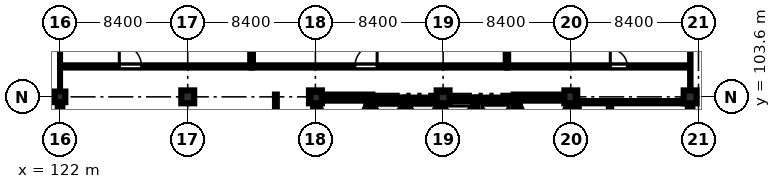
"""IFC4 building model, lengths in metres.
Left out: names, types, materials, properties, quantities, classifications, styles, units other than length and angle.
Written with IfcOpenShell. Run it as: python <this file> out.ifc"""

import sys

from ifc_helpers import new_model, si_unit, direction, frame, frame_2d, origin, origin_2d, place, context, subcontext, project, spatial, rectangle, extrude, element, fill, save


model = new_model("IFC4")
c1 = context("Model", 3, precision=1e-05, world=origin(), true_north=direction((0.0, 1.0)))
c2 = subcontext(c1, "Body", "Model", "MODEL_VIEW")
j1 = project(units=[si_unit("LENGTHUNIT", "METRE"), si_unit("PLANEANGLEUNIT", "RADIAN")], contexts=[c1])
p1 = place(None, origin())
s1 = spatial("IfcSite", under=j1, at=p1, CompositionType="ELEMENT")
p2 = place(p1, origin())
s2 = spatial("IfcBuilding", under=s1, at=p2, CompositionType="ELEMENT")
p3 = place(p2, frame((0.0, 0.0, 23.4)))
s3 = spatial("IfcBuildingStorey", under=s2, at=p3, CompositionType="ELEMENT", Elevation=23.4)
p4 = place(p3, frame((122.0, 103.6, 0.0), z_axis=(0.0, 0.0, 1.0), x_axis=(1.0, 0.0, 0.0)))
e1 = element("IfcColumn", 1, at=p4, inside=s3, PredefinedType="COLUMN", context=c2, shape_type="SweptSolid", body=[
    extrude(rectangle(XDim=0.7, YDim=0.7, at=origin_2d()), origin(), (0.0, 0.0, 1.0), 4.0),
])
for number, where, z_axis, x_axis in (
    (2, (130.4, 103.6, 0.0), (0.0, 0.0, 1.0), (1.0, 0.0, 0.0)),
    (3, (138.8, 103.6, 0.0), (0.0, 0.0, 1.0), (1.0, 0.0, 0.0)),
    (4, (147.2, 103.6, 0.0), (0.0, 0.0, 1.0), (1.0, 0.0, 0.0)),
    (5, (155.6, 103.6, 0.0), (0.0, 0.0, 1.0), (1.0, 0.0, 0.0)),
    (6, (163.45, 103.6, 0.0), (0.0, 0.0, 1.0), (1.0, 0.0, 0.0)),
):
    element("IfcColumn", number, at=place(p3, frame(where, z_axis=z_axis, x_axis=x_axis)), inside=s3, PredefinedType="COLUMN", context=c2, shape_type="SweptSolid", body=[
        extrude(rectangle(XDim=0.85, YDim=0.85, at=origin_2d()), origin(), (0.0, 0.0, 1.0), 4.0),
    ])
p5 = place(p3, frame((138.65, 103.55, 0.0), z_axis=(0.0, 0.0, 1.0), x_axis=(1.0, 0.0, 0.0)))
e7 = element("IfcWall", 7, at=p5, inside=s3, PredefinedType="SHEAR", context=c2, shape_type="SweptSolid", body=[
    extrude(rectangle(XDim=3.9, YDim=0.4, at=frame_2d((1.95, 0.0))), origin(), (0.0, 0.0, 1.0), 4.0),
])
p6 = place(p3, frame((138.85, 95.45, 0.0), z_axis=(0.0, 0.0, 1.0), x_axis=(0.0, 1.0, 0.0)))
e8 = element("IfcWall", 8, at=p6, inside=s3, PredefinedType="SHEAR", context=c2, shape_type="SweptSolid", body=[
    extrude(rectangle(XDim=7.9, YDim=0.4, at=frame_2d((3.95, 0.0))), origin(), (0.0, 0.0, 1.0), 4.0),
])
p7 = place(p3, frame((142.35, 95.45, 0.0), z_axis=(0.0, 0.0, 1.0), x_axis=(0.0, 1.0, 0.0)))
e9 = element("IfcWall", 9, at=p7, inside=s3, PredefinedType="SHEAR", context=c2, shape_type="SweptSolid", body=[
    extrude(rectangle(XDim=7.9, YDim=0.4, at=frame_2d((3.95, 0.0))), origin(), (0.0, 0.0, 1.0), 4.0),
])
p8 = place(p7, frame((0.22, 0.0, 0.0)))
e10 = element("IfcOpeningElement", 10, at=p8, cuts=e9, PredefinedType="OPENING", context=c2, shape_type="SweptSolid", body=[
    extrude(rectangle(XDim=1.15, YDim=2.15, at=frame_2d((0.575, 1.075))), frame((0.0, 0.21, 0.0), z_axis=(0.0, -1.0, 0.0), x_axis=(1.0, 0.0, 0.0)), (0.0, 0.0, 1.0), 0.42),
])
p9 = place(p3, frame((151.85, 103.55, 0.0), z_axis=(0.0, 0.0, 1.0), x_axis=(1.0, 0.0, 0.0)))
e11 = element("IfcWall", 11, at=p9, inside=s3, PredefinedType="SHEAR", context=c2, shape_type="SweptSolid", body=[
    extrude(rectangle(XDim=3.9, YDim=0.4, at=frame_2d((1.95, 0.0))), origin(), (0.0, 0.0, 1.0), 4.0),
])
p10 = place(p3, frame((152.05, 95.45, 0.0), z_axis=(0.0, 0.0, 1.0), x_axis=(0.0, 1.0, 0.0)))
e12 = element("IfcWall", 12, at=p10, inside=s3, PredefinedType="SHEAR", context=c2, shape_type="SweptSolid", body=[
    extrude(rectangle(XDim=7.9, YDim=0.4, at=frame_2d((3.95, 0.0))), origin(), (0.0, 0.0, 1.0), 4.0),
])
p11 = place(p10, frame((0.35, 0.0, 0.0)))
e13 = element("IfcOpeningElement", 13, at=p11, cuts=e12, PredefinedType="OPENING", context=c2, shape_type="SweptSolid", body=[
    extrude(rectangle(XDim=1.15, YDim=2.15, at=frame_2d((0.575, 1.075))), frame((0.0, 0.21, 0.0), z_axis=(0.0, -1.0, 0.0), x_axis=(1.0, 0.0, 0.0)), (0.0, 0.0, 1.0), 0.42),
])
p12 = place(p3, frame((155.55, 95.45, 0.0), z_axis=(0.0, 0.0, 1.0), x_axis=(0.0, 1.0, 0.0)))
e14 = element("IfcWall", 14, at=p12, inside=s3, PredefinedType="SHEAR", context=c2, shape_type="SweptSolid", body=[
    extrude(rectangle(XDim=7.9, YDim=0.4, at=frame_2d((3.95, 0.0))), origin(), (0.0, 0.0, 1.0), 4.0),
])
p13 = place(p3, frame((142.55, 103.425, 0.0), z_axis=(0.0, 0.0, 1.0), x_axis=(1.0, 0.0, 0.0)))
e15 = element("IfcWall", 15, at=p13, inside=s3, PredefinedType="SHEAR", context=c2, shape_type="SweptSolid", body=[
    extrude(rectangle(XDim=2.05, YDim=0.25, at=frame_2d((1.025, 0.0))), origin(), (0.0, 0.0, 1.0), 4.0),
])
p14 = place(p3, frame((144.725, 100.15, 0.0), z_axis=(0.0, 0.0, 1.0), x_axis=(0.0, 1.0, 0.0)))
e16 = element("IfcWall", 16, at=p14, inside=s3, PredefinedType="SHEAR", context=c2, shape_type="SweptSolid", body=[
    extrude(rectangle(XDim=3.4, YDim=0.25, at=frame_2d((1.7, 0.0))), origin(), (0.0, 0.0, 1.0), 4.0),
])
p15 = place(p3, frame((144.85, 103.425, 0.0), z_axis=(0.0, 0.0, 1.0), x_axis=(1.0, 0.0, 0.0)))
e17 = element("IfcWall", 17, at=p15, inside=s3, PredefinedType="SHEAR", context=c2, shape_type="SweptSolid", body=[
    extrude(rectangle(XDim=2.05, YDim=0.25, at=frame_2d((1.025, 0.0))), origin(), (0.0, 0.0, 1.0), 4.0),
])
p16 = place(p3, frame((147.025, 100.15, 0.0), z_axis=(0.0, 0.0, 1.0), x_axis=(0.0, 1.0, 0.0)))
e18 = element("IfcWall", 18, at=p16, inside=s3, PredefinedType="SHEAR", context=c2, shape_type="SweptSolid", body=[
    extrude(rectangle(XDim=3.4, YDim=0.25, at=frame_2d((1.7, 0.0))), origin(), (0.0, 0.0, 1.0), 4.0),
])
p17 = place(p3, frame((147.15, 103.425, 0.0), z_axis=(0.0, 0.0, 1.0), x_axis=(1.0, 0.0, 0.0)))
e19 = element("IfcWall", 19, at=p17, inside=s3, PredefinedType="SHEAR", context=c2, shape_type="SweptSolid", body=[
    extrude(rectangle(XDim=2.05, YDim=0.25, at=frame_2d((1.025, 0.0))), origin(), (0.0, 0.0, 1.0), 4.0),
])
p18 = place(p3, frame((149.325, 100.35, 0.0), z_axis=(0.0, 0.0, 1.0), x_axis=(0.0, 1.0, 0.0)))
e20 = element("IfcWall", 20, at=p18, inside=s3, PredefinedType="SHEAR", context=c2, shape_type="SweptSolid", body=[
    extrude(rectangle(XDim=3.2, YDim=0.25, at=frame_2d((1.6, 0.0))), origin(), (0.0, 0.0, 1.0), 4.0),
])
p19 = place(p3, frame((149.45, 103.425, 0.0), z_axis=(0.0, 0.0, 1.0), x_axis=(1.0, 0.0, 0.0)))
e21 = element("IfcWall", 21, at=p19, inside=s3, PredefinedType="SHEAR", context=c2, shape_type="SweptSolid", body=[
    extrude(rectangle(XDim=2.4, YDim=0.25, at=frame_2d((1.2, 0.0))), origin(), (0.0, 0.0, 1.0), 4.0),
])
p20 = place(p3, frame((163.45, 103.175, 0.0), z_axis=(0.0, 0.0, 1.0), x_axis=(0.0, -1.0, 0.0)))
e22 = element("IfcWall", 22, at=p20, inside=s3, PredefinedType="STANDARD", context=c2, shape_type="SweptSolid", body=[
    extrude(rectangle(XDim=7.55, YDim=0.3, at=frame_2d((3.775, 0.0))), origin(), (0.0, 0.0, 1.0), 3.3),
])
p21 = place(p20, frame((1.15, 0.0, 1.1)))
e23 = element("IfcOpeningElement", 23, at=p21, cuts=e22, PredefinedType="OPENING", context=c2, shape_type="SweptSolid", body=[
    extrude(rectangle(XDim=1.4, YDim=1.4, at=frame_2d((0.7, 0.7))), frame((0.0, 0.16, 0.0), z_axis=(0.0, -1.0, 0.0), x_axis=(1.0, 0.0, 0.0)), (0.0, 0.0, 1.0), 0.32),
])
p22 = place(p3, frame((122.0, 95.55, 0.0), z_axis=(0.0, 0.0, 1.0), x_axis=(0.0, 1.0, 0.0)))
e24 = element("IfcWall", 24, at=p22, inside=s3, PredefinedType="STANDARD", context=c2, shape_type="SweptSolid", body=[
    extrude(rectangle(XDim=7.7, YDim=0.3, at=frame_2d((3.85, 0.0))), origin(), (0.0, 0.0, 1.0), 3.3),
])
p23 = place(p22, frame((2.4, 0.0, 1.0)))
e25 = element("IfcOpeningElement", 25, at=p23, cuts=e24, PredefinedType="OPENING", context=c2, shape_type="SweptSolid", body=[
    extrude(rectangle(XDim=1.8, YDim=1.8, at=frame_2d((0.9, 0.9))), frame((0.0, 0.16, 0.0), z_axis=(0.0, -1.0, 0.0), x_axis=(1.0, 0.0, 0.0)), (0.0, 0.0, 1.0), 0.32),
])
p24 = place(p3, frame((158.18, 94.68, 0.0), z_axis=(0.0, 0.0, 1.0), x_axis=(0.0, 1.0, 0.0)))
e26 = element("IfcWall", 26, at=p24, inside=s3, PredefinedType="PARTITIONING", context=c2, shape_type="SweptSolid", body=[
    extrude(rectangle(XDim=8.57, YDim=0.15, at=frame_2d((4.285, 0.0))), origin(), (0.0, 0.0, 1.0), 4.0),
])
p25 = place(p24, frame((0.8, 0.0, 0.0)))
e27 = element("IfcOpeningElement", 27, at=p25, cuts=e26, PredefinedType="OPENING", context=c2, shape_type="SweptSolid", body=[
    extrude(rectangle(XDim=1.0, YDim=2.12, at=frame_2d((0.5, 1.06))), frame((0.0, 0.085, 0.0), z_axis=(0.0, -1.0, 0.0), x_axis=(1.0, 0.0, 0.0)), (0.0, 0.0, 1.0), 0.17),
])
p26 = place(p24, frame((3.5, 0.0, 0.0)))
e28 = element("IfcOpeningElement", 28, at=p26, cuts=e26, PredefinedType="OPENING", context=c2, shape_type="SweptSolid", body=[
    extrude(rectangle(XDim=0.92, YDim=2.1, at=frame_2d((0.46, 1.05))), frame((0.0, 0.085, 0.0), z_axis=(0.0, -1.0, 0.0), x_axis=(1.0, 0.0, 0.0)), (0.0, 0.0, 1.0), 0.17),
])
p27 = place(p24, frame((6.4, 0.0, 0.0)))
e29 = element("IfcOpeningElement", 29, at=p27, cuts=e26, PredefinedType="OPENING", context=c2, shape_type="SweptSolid", body=[
    extrude(rectangle(XDim=0.92, YDim=2.1, at=frame_2d((0.46, 1.05))), frame((0.0, 0.085, 0.0), z_axis=(0.0, -1.0, 0.0), x_axis=(1.0, 0.0, 0.0)), (0.0, 0.0, 1.0), 0.17),
])
p28 = place(p3, frame((156.05, 103.25, 0.0), z_axis=(0.0, 0.0, 1.0), x_axis=(1.0, 0.0, 0.0)))
e30 = element("IfcWall", 30, at=p28, inside=s3, PredefinedType="PARTITIONING", context=c2, shape_type="SweptSolid", body=[
    extrude(rectangle(XDim=7.15, YDim=0.15, at=frame_2d((3.575, 0.0))), origin(), (0.0, 0.0, 1.0), 4.0),
])
p29 = place(p3, frame((156.05, 94.68, 0.0), z_axis=(0.0, 0.0, 1.0), x_axis=(0.0, 1.0, 0.0)))
e31 = element("IfcWall", 31, at=p29, inside=s3, PredefinedType="PARTITIONING", context=c2, shape_type="SweptSolid", body=[
    extrude(rectangle(XDim=8.57, YDim=0.15, at=frame_2d((4.285, 0.0))), origin(), (0.0, 0.0, 1.0), 4.0),
])
p30 = place(p3, frame((136.2, 94.68, 0.0), z_axis=(0.0, 0.0, 1.0), x_axis=(0.0, 1.0, 0.0)))
e32 = element("IfcWall", 32, at=p30, inside=s3, PredefinedType="PARTITIONING", context=c2, shape_type="SweptSolid", body=[
    extrude(rectangle(XDim=9.07, YDim=0.12, at=frame_2d((4.535, 0.0))), origin(), (0.0, 0.0, 1.0), 4.0),
])
p31 = place(p3, frame((122.15, 105.6, 0.0), z_axis=(0.0, 0.0, 1.0), x_axis=(1.0, 0.0, 0.0)))
e33 = element("IfcWall", 33, at=p31, inside=s3, PredefinedType="PARTITIONING", context=c2, shape_type="SweptSolid", body=[
    extrude(rectangle(XDim=12.45, YDim=0.145, at=frame_2d((6.225, 0.0))), origin(), (0.0, 0.0, 1.0), 4.0),
])
p32 = place(p31, frame((3.75, 0.0, 0.0)))
e34 = element("IfcOpeningElement", 34, at=p32, cuts=e33, PredefinedType="OPENING", context=c2, shape_type="SweptSolid", body=[
    extrude(rectangle(XDim=1.46, YDim=2.22, at=frame_2d((0.73, 1.11))), frame((0.0, 0.083, 0.0), z_axis=(0.0, -1.0, 0.0), x_axis=(1.0, 0.0, 0.0)), (0.0, 0.0, 1.0), 0.165),
])
p33 = place(p3, frame((134.6, 105.6, 0.0), z_axis=(0.0, 0.0, 1.0), x_axis=(1.0, 0.0, 0.0)))
e35 = element("IfcWall", 35, at=p33, inside=s3, PredefinedType="PARTITIONING", context=c2, shape_type="SweptSolid", body=[
    extrude(rectangle(XDim=16.8, YDim=0.145, at=frame_2d((8.4, 0.0))), origin(), (0.0, 0.0, 1.0), 4.0),
])
p34 = place(p33, frame((6.8, 0.0, 0.0)))
e36 = element("IfcOpeningElement", 36, at=p34, cuts=e35, PredefinedType="OPENING", context=c2, shape_type="SweptSolid", body=[
    extrude(rectangle(XDim=1.46, YDim=2.22, at=frame_2d((0.73, 1.11))), frame((0.0, 0.083, 0.0), z_axis=(0.0, -1.0, 0.0), x_axis=(1.0, 0.0, 0.0)), (0.0, 0.0, 1.0), 0.165),
])
p35 = place(p3, frame((134.6, 105.6, 0.0), z_axis=(0.0, 0.0, 1.0), x_axis=(0.0, 1.0, 0.0)))
e37 = element("IfcWall", 37, at=p35, inside=s3, PredefinedType="STANDARD", context=c2, shape_type="SweptSolid", body=[
    extrude(rectangle(XDim=5.75, YDim=0.18, at=frame_2d((2.875, 0.0))), origin(), (0.0, 0.0, 1.0), 3.5),
])
p36 = place(p3, frame((151.4, 105.6, 0.0), z_axis=(0.0, 0.0, 1.0), x_axis=(1.0, 0.0, 0.0)))
e38 = element("IfcWall", 38, at=p36, inside=s3, PredefinedType="PARTITIONING", context=c2, shape_type="SweptSolid", body=[
    extrude(rectangle(XDim=11.95, YDim=0.145, at=frame_2d((5.975, 0.0))), origin(), (0.0, 0.0, 1.0), 4.0),
])
p37 = place(p36, frame((6.8, 0.0, 0.0)))
e39 = element("IfcOpeningElement", 39, at=p37, cuts=e38, PredefinedType="OPENING", context=c2, shape_type="SweptSolid", body=[
    extrude(rectangle(XDim=1.12, YDim=2.18, at=frame_2d((0.56, 1.09))), frame((0.0, 0.083, 0.0), z_axis=(0.0, -1.0, 0.0), x_axis=(1.0, 0.0, 0.0)), (0.0, 0.0, 1.0), 0.165),
])
p38 = place(p3, frame((151.4, 105.6, 0.0), z_axis=(0.0, 0.0, 1.0), x_axis=(0.0, 1.0, 0.0)))
e40 = element("IfcWall", 40, at=p38, inside=s3, PredefinedType="PARTITIONING", context=c2, shape_type="SweptSolid", body=[
    extrude(rectangle(XDim=5.75, YDim=0.158, at=frame_2d((2.875, 0.0))), origin(), (0.0, 0.0, 1.0), 3.5),
])
p39 = place(p32, origin())
e41 = element("IfcDoor", 41, at=p39, inside=s3, OperationType="SINGLE_SWING_LEFT", PredefinedType="DOOR", context=c2, shape_type="SweptSolid", body=[
    extrude(rectangle(XDim=1.46, YDim=2.22, at=frame_2d((0.73, 1.11))), frame((0.0, 0.025, 0.0), z_axis=(0.0, -1.0, 0.0), x_axis=(1.0, 0.0, 0.0)), (0.0, 0.0, 1.0), 0.05),
])
fill(e34, e41)
p40 = place(p34, origin())
e42 = element("IfcDoor", 42, at=p40, inside=s3, OperationType="SINGLE_SWING_RIGHT", PredefinedType="DOOR", context=c2, shape_type="SweptSolid", body=[
    extrude(rectangle(XDim=1.46, YDim=2.22, at=frame_2d((0.73, 1.11))), frame((0.0, 0.025, 0.0), z_axis=(0.0, -1.0, 0.0), x_axis=(1.0, 0.0, 0.0)), (0.0, 0.0, 1.0), 0.05),
])
fill(e36, e42)
p41 = place(p37, origin())
e43 = element("IfcDoor", 43, at=p41, inside=s3, OperationType="SINGLE_SWING_LEFT", PredefinedType="DOOR", context=c2, shape_type="SweptSolid", body=[
    extrude(rectangle(XDim=1.12, YDim=2.18, at=frame_2d((0.56, 1.09))), frame((0.0, 0.025, 0.0), z_axis=(0.0, -1.0, 0.0), x_axis=(1.0, 0.0, 0.0)), (0.0, 0.0, 1.0), 0.05),
])
fill(e39, e43)
save(model, sys.argv[1])
